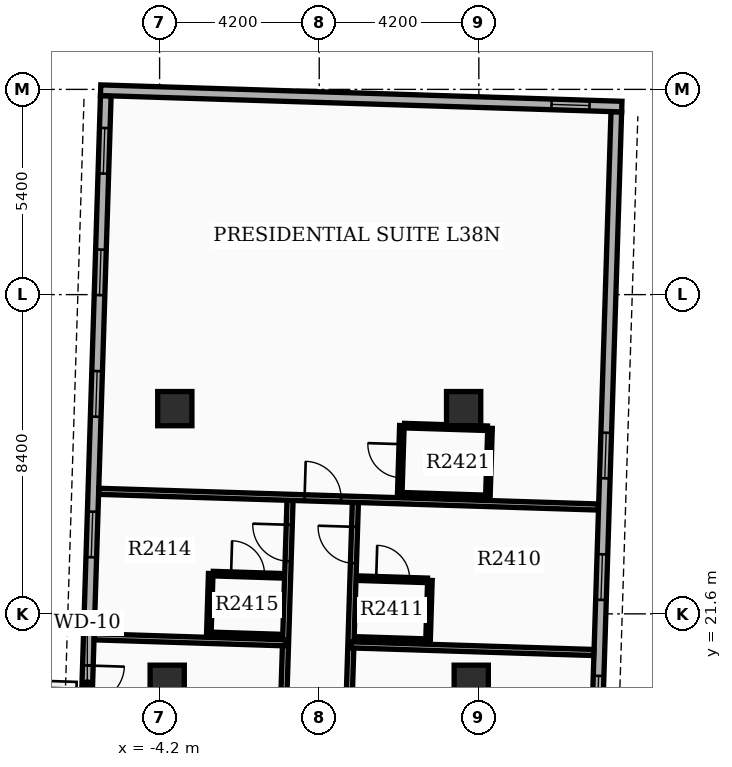
"""IFC4 building model, lengths in metres.
Left out: names, types, materials, properties, quantities, classifications, styles, units other than length and angle.
Written with IfcOpenShell. Run it as: python <this file> out.ifc"""

import sys

from ifc_helpers import new_model, si_unit, direction, frame, frame_2d, origin, origin_2d, place, context, subcontext, project, spatial, rectangle, extrude, element, fill, save


model = new_model("IFC4")
c1 = context("Model", 3, precision=1e-05, world=origin(), true_north=direction((0.0, 1.0)))
c2 = subcontext(c1, "Body", "Model", "MODEL_VIEW")
j1 = project(units=[si_unit("LENGTHUNIT", "METRE"), si_unit("PLANEANGLEUNIT", "RADIAN")], contexts=[c1])
p1 = place(None, origin())
s1 = spatial("IfcSite", under=j1, at=p1, CompositionType="ELEMENT")
p2 = place(p1, origin())
s2 = spatial("IfcBuilding", under=s1, at=p2, CompositionType="ELEMENT")
p3 = place(p2, frame((0.0, 0.0, 152.7)))
s3 = spatial("IfcBuildingStorey", under=s2, at=p3, CompositionType="ELEMENT", Elevation=152.7)
for number, where, z_axis, x_axis in (
    (1, (-4.0, 19.8, 0.0), (0.0, 0.0, 1.0), (1.0, 0.0, 0.0)),
    (2, (4.0, 19.8, 0.0), (0.0, 0.0, 1.0), (1.0, 0.0, 0.0)),
    (3, (-3.8, 27.0, 0.0), (0.0, 0.0, 1.0), (1.0, 0.0, 0.0)),
    (4, (3.8, 27.0, 0.0), (0.0, 0.0, 1.0), (1.0, 0.0, 0.0)),
):
    element("IfcColumn", number, at=place(p3, frame(where, z_axis=z_axis, x_axis=x_axis)), inside=s3, PredefinedType="COLUMN", context=c2, shape_type="SweptSolid", body=[
        extrude(rectangle(XDim=0.9, YDim=0.9, at=origin_2d()), origin(), (0.0, 0.0, 1.0), 3.9),
    ])
p4 = place(p3, frame((7.186, 14.721, 0.0), z_axis=(0.0, 0.0, 1.0), x_axis=(0.031410322165, 0.999506574096, 0.0)))
e5 = element("IfcWall", 5, at=p4, inside=s3, PredefinedType="STANDARD", context=c2, shape_type="SweptSolid", body=[
    extrude(rectangle(XDim=20.1, YDim=0.28, at=frame_2d((10.05, 0.0))), origin(), (0.0, 0.0, 1.0), 2.97),
])
p5 = place(p4, frame((0.85, 0.0, 0.8)))
e6 = element("IfcOpeningElement", 6, at=p5, cuts=e5, PredefinedType="OPENING", context=c2, shape_type="SweptSolid", body=[
    extrude(rectangle(XDim=1.2, YDim=1.6, at=frame_2d((0.6, 0.8))), frame((0.0, 0.15, 0.0), z_axis=(0.0, -1.0, 0.0), x_axis=(1.0, 0.0, 0.0)), (0.0, 0.0, 1.0), 0.3),
])
p6 = place(p4, frame((4.05, 0.0, 0.8)))
e7 = element("IfcOpeningElement", 7, at=p6, cuts=e5, PredefinedType="OPENING", context=c2, shape_type="SweptSolid", body=[
    extrude(rectangle(XDim=1.2, YDim=1.6, at=frame_2d((0.6, 0.8))), frame((0.0, 0.15, 0.0), z_axis=(0.0, -1.0, 0.0), x_axis=(1.0, 0.0, 0.0)), (0.0, 0.0, 1.0), 0.3),
])
p7 = place(p4, frame((7.25, 0.0, 0.8)))
e8 = element("IfcOpeningElement", 8, at=p7, cuts=e5, PredefinedType="OPENING", context=c2, shape_type="SweptSolid", body=[
    extrude(rectangle(XDim=1.2, YDim=1.6, at=frame_2d((0.6, 0.8))), frame((0.0, 0.15, 0.0), z_axis=(0.0, -1.0, 0.0), x_axis=(1.0, 0.0, 0.0)), (0.0, 0.0, 1.0), 0.3),
])
p8 = place(p4, frame((10.45, 0.0, 0.8)))
e9 = element("IfcOpeningElement", 9, at=p8, cuts=e5, PredefinedType="OPENING", context=c2, shape_type="SweptSolid", body=[
    extrude(rectangle(XDim=1.2, YDim=1.6, at=frame_2d((0.6, 0.8))), frame((0.0, 0.15, 0.0), z_axis=(0.0, -1.0, 0.0), x_axis=(1.0, 0.0, 0.0)), (0.0, 0.0, 1.0), 0.3),
])
p9 = place(p3, frame((-5.616, 35.234, 0.0), z_axis=(0.0, 0.0, 1.0), x_axis=(-0.031398187845, -0.999506955354, 0.0)))
e10 = element("IfcWall", 10, at=p9, inside=s3, PredefinedType="STANDARD", context=c2, shape_type="SweptSolid", body=[
    extrude(rectangle(XDim=20.1, YDim=0.28, at=frame_2d((10.05, 0.0))), origin(), (0.0, 0.0, 1.0), 2.97),
])
p10 = place(p9, frame((0.85, 0.0, 0.8)))
e11 = element("IfcOpeningElement", 11, at=p10, cuts=e10, PredefinedType="OPENING", context=c2, shape_type="SweptSolid", body=[
    extrude(rectangle(XDim=1.2, YDim=1.6, at=frame_2d((0.6, 0.8))), frame((0.0, 0.15, 0.0), z_axis=(0.0, -1.0, 0.0), x_axis=(1.0, 0.0, 0.0)), (0.0, 0.0, 1.0), 0.3),
])
p11 = place(p9, frame((4.05, 0.0, 0.8)))
e12 = element("IfcOpeningElement", 12, at=p11, cuts=e10, PredefinedType="OPENING", context=c2, shape_type="SweptSolid", body=[
    extrude(rectangle(XDim=1.2, YDim=1.6, at=frame_2d((0.6, 0.8))), frame((0.0, 0.15, 0.0), z_axis=(0.0, -1.0, 0.0), x_axis=(1.0, 0.0, 0.0)), (0.0, 0.0, 1.0), 0.3),
])
p12 = place(p9, frame((7.25, 0.0, 0.8)))
e13 = element("IfcOpeningElement", 13, at=p12, cuts=e10, PredefinedType="OPENING", context=c2, shape_type="SweptSolid", body=[
    extrude(rectangle(XDim=1.2, YDim=1.6, at=frame_2d((0.6, 0.8))), frame((0.0, 0.15, 0.0), z_axis=(0.0, -1.0, 0.0), x_axis=(1.0, 0.0, 0.0)), (0.0, 0.0, 1.0), 0.3),
])
p13 = place(p9, frame((10.95, 0.0, 0.8)))
e14 = element("IfcOpeningElement", 14, at=p13, cuts=e10, PredefinedType="OPENING", context=c2, shape_type="SweptSolid", body=[
    extrude(rectangle(XDim=1.2, YDim=1.6, at=frame_2d((0.6, 0.8))), frame((0.0, 0.15, 0.0), z_axis=(0.0, -1.0, 0.0), x_axis=(1.0, 0.0, 0.0)), (0.0, 0.0, 1.0), 0.3),
])
p14 = place(p9, frame((15.0, 0.0, 0.0)))
e15 = element("IfcOpeningElement", 15, at=p14, cuts=e10, PredefinedType="OPENING", context=c2, shape_type="SweptSolid", body=[
    extrude(rectangle(XDim=0.96, YDim=2.1, at=frame_2d((0.48, 1.05))), frame((0.0, 0.15, 0.0), z_axis=(0.0, -1.0, 0.0), x_axis=(1.0, 0.0, 0.0)), (0.0, 0.0, 1.0), 0.3),
])
p15 = place(p3, frame((7.962, 34.947, 0.0), z_axis=(0.0, 0.0, 1.0), x_axis=(-0.999506679556, 0.031406966164, 0.0)))
e16 = element("IfcWall", 16, at=p15, inside=s3, PredefinedType="STANDARD", context=c2, shape_type="SweptSolid", body=[
    extrude(rectangle(XDim=13.72, YDim=0.28, at=frame_2d((6.86, 0.0))), origin(), (0.0, 0.0, 1.0), 2.97),
])
p16 = place(p15, frame((0.85, 0.0, 0.85)))
e17 = element("IfcOpeningElement", 17, at=p16, cuts=e16, PredefinedType="OPENING", context=c2, shape_type="SweptSolid", body=[
    extrude(rectangle(XDim=1.0, YDim=1.5, at=frame_2d((0.5, 0.75))), frame((0.0, 0.15, 0.0), z_axis=(0.0, -1.0, 0.0), x_axis=(1.0, 0.0, 0.0)), (0.0, 0.0, 1.0), 0.3),
])
p17 = place(p3, frame((0.646, 14.837, 0.0), z_axis=(0.0, 0.0, 1.0), x_axis=(0.031385618091, 0.999507350137, 0.0)))
e18 = element("IfcWall", 18, at=p17, inside=s3, PredefinedType="PARTITIONING", context=c2, shape_type="SweptSolid", body=[
    extrude(rectangle(XDim=9.7, YDim=0.16, at=frame_2d((4.85, 0.0))), origin(), (0.0, 0.0, 1.0), 2.96),
])
p18 = place(p17, frame((2.575, 0.0, 0.0)))
e19 = element("IfcOpeningElement", 19, at=p18, cuts=e18, PredefinedType="OPENING", context=c2, shape_type="SweptSolid", body=[
    extrude(rectangle(XDim=0.96, YDim=2.15, at=frame_2d((0.48, 1.075))), frame((0.0, 0.09, 0.0), z_axis=(0.0, -1.0, 0.0), x_axis=(1.0, 0.0, 0.0)), (0.0, 0.0, 1.0), 0.18),
])
p19 = place(p17, frame((8.097, 0.0, 0.0)))
e20 = element("IfcOpeningElement", 20, at=p19, cuts=e18, PredefinedType="OPENING", context=c2, shape_type="SweptSolid", body=[
    extrude(rectangle(XDim=0.96, YDim=2.15, at=frame_2d((0.48, 1.075))), frame((0.0, 0.09, 0.0), z_axis=(0.0, -1.0, 0.0), x_axis=(1.0, 0.0, 0.0)), (0.0, 0.0, 1.0), 0.18),
])
p20 = place(p3, frame((0.833, 20.784, 0.0), z_axis=(0.0, 0.0, 1.0), x_axis=(0.999505833379, -0.031433883636, 0.0)))
e21 = element("IfcWall", 21, at=p20, inside=s3, PredefinedType="PARTITIONING", context=c2, shape_type="SweptSolid", body=[
    extrude(rectangle(XDim=6.392, YDim=0.16, at=frame_2d((3.196, 0.0))), origin(), (0.0, 0.0, 1.0), 2.96),
])
p21 = place(p3, frame((1.029, 22.539, 0.0), z_axis=(0.0, 0.0, 1.0), x_axis=(0.999507221803, -0.031389704724, 0.0)))
e22 = element("IfcWall", 22, at=p21, inside=s3, PredefinedType="PARTITIONING", context=c2, shape_type="SweptSolid", body=[
    extrude(rectangle(XDim=1.82, YDim=0.12, at=frame_2d((0.91, 0.0))), origin(), (0.0, 0.0, 1.0), 2.96),
])
p22 = place(p21, frame((0.47, 0.0, 0.0)))
e23 = element("IfcOpeningElement", 23, at=p22, cuts=e22, PredefinedType="OPENING", context=c2, shape_type="SweptSolid", body=[
    extrude(rectangle(XDim=0.88, YDim=2.1, at=frame_2d((0.44, 1.05))), frame((0.0, 0.07, 0.0), z_axis=(0.0, -1.0, 0.0), x_axis=(1.0, 0.0, 0.0)), (0.0, 0.0, 1.0), 0.14),
])
p23 = place(p3, frame((0.978, 20.94, 0.0), z_axis=(0.0, 0.0, 1.0), x_axis=(0.999503004171, -0.03152371574, 0.0)))
e24 = element("IfcWall", 24, at=p23, inside=s3, PredefinedType="PARTITIONING", context=c2, shape_type="SweptSolid", body=[
    extrude(rectangle(XDim=1.82, YDim=0.12, at=frame_2d((0.91, 0.0))), origin(), (0.0, 0.0, 1.0), 2.96),
])
p24 = place(p3, frame((2.862, 20.88, 0.0), z_axis=(0.0, 0.0, 1.0), x_axis=(0.031434839006, 0.999505803333, 0.0)))
e25 = element("IfcWall", 25, at=p24, inside=s3, PredefinedType="PARTITIONING", context=c2, shape_type="SweptSolid", body=[
    extrude(rectangle(XDim=1.6, YDim=0.12, at=frame_2d((0.8, 0.0))), origin(), (0.0, 0.0, 1.0), 2.96),
])
p25 = place(p3, frame((-1.073, 14.891, 0.0), z_axis=(0.0, 0.0, 1.0), x_axis=(0.031411552371, 0.999506535435, 0.0)))
e26 = element("IfcWall", 26, at=p25, inside=s3, PredefinedType="PARTITIONING", context=c2, shape_type="SweptSolid", body=[
    extrude(rectangle(XDim=9.7, YDim=0.16, at=frame_2d((4.85, 0.0))), origin(), (0.0, 0.0, 1.0), 2.96),
])
p26 = place(p25, frame((2.575, 0.0, 0.0)))
e27 = element("IfcOpeningElement", 27, at=p26, cuts=e26, PredefinedType="OPENING", context=c2, shape_type="SweptSolid", body=[
    extrude(rectangle(XDim=0.96, YDim=2.15, at=frame_2d((0.48, 1.075))), frame((0.0, 0.09, 0.0), z_axis=(0.0, -1.0, 0.0), x_axis=(1.0, 0.0, 0.0)), (0.0, 0.0, 1.0), 0.18),
])
p27 = place(p25, frame((8.097, 0.0, 0.0)))
e28 = element("IfcOpeningElement", 28, at=p27, cuts=e26, PredefinedType="OPENING", context=c2, shape_type="SweptSolid", body=[
    extrude(rectangle(XDim=0.96, YDim=2.15, at=frame_2d((0.48, 1.075))), frame((0.0, 0.09, 0.0), z_axis=(0.0, -1.0, 0.0), x_axis=(1.0, 0.0, 0.0)), (0.0, 0.0, 1.0), 0.18),
])
p28 = place(p3, frame((-0.886, 20.838, 0.0), z_axis=(0.0, 0.0, 1.0), x_axis=(-0.999507140691, 0.03139228738, 0.0)))
e29 = element("IfcWall", 29, at=p28, inside=s3, PredefinedType="PARTITIONING", context=c2, shape_type="SweptSolid", body=[
    extrude(rectangle(XDim=5.032, YDim=0.16, at=frame_2d((2.516, 0.0))), origin(), (0.0, 0.0, 1.0), 2.96),
])
p29 = place(p3, frame((-2.79, 22.659, 0.0), z_axis=(0.0, 0.0, 1.0), x_axis=(0.999507221803, -0.031389704724, 0.0)))
e30 = element("IfcWall", 30, at=p29, inside=s3, PredefinedType="PARTITIONING", context=c2, shape_type="SweptSolid", body=[
    extrude(rectangle(XDim=1.82, YDim=0.12, at=frame_2d((0.91, 0.0))), origin(), (0.0, 0.0, 1.0), 2.96),
])
p30 = place(p29, frame((0.47, 0.0, 0.0)))
e31 = element("IfcOpeningElement", 31, at=p30, cuts=e30, PredefinedType="OPENING", context=c2, shape_type="SweptSolid", body=[
    extrude(rectangle(XDim=0.88, YDim=2.1, at=frame_2d((0.44, 1.05))), frame((0.0, 0.07, 0.0), z_axis=(0.0, -1.0, 0.0), x_axis=(1.0, 0.0, 0.0)), (0.0, 0.0, 1.0), 0.14),
])
p31 = place(p3, frame((-2.84, 21.06, 0.0), z_axis=(0.0, 0.0, 1.0), x_axis=(0.999507221803, -0.031389704724, 0.0)))
e32 = element("IfcWall", 32, at=p31, inside=s3, PredefinedType="PARTITIONING", context=c2, shape_type="SweptSolid", body=[
    extrude(rectangle(XDim=1.82, YDim=0.12, at=frame_2d((0.91, 0.0))), origin(), (0.0, 0.0, 1.0), 2.96),
])
p32 = place(p3, frame((-2.905, 21.062, 0.0), z_axis=(0.0, 0.0, 1.0), x_axis=(0.031430045267, 0.999505954087, 0.0)))
e33 = element("IfcWall", 33, at=p32, inside=s3, PredefinedType="PARTITIONING", context=c2, shape_type="SweptSolid", body=[
    extrude(rectangle(XDim=1.6, YDim=0.12, at=frame_2d((0.8, 0.0))), origin(), (0.0, 0.0, 1.0), 2.96),
])
p33 = place(p3, frame((-5.795, 24.824, 0.0), z_axis=(0.0, 0.0, 1.0), x_axis=(0.999507189267, -0.031390740738, 0.0)))
e34 = element("IfcWall", 34, at=p33, inside=s3, PredefinedType="PARTITIONING", context=c2, shape_type="SweptSolid", body=[
    extrude(rectangle(XDim=13.144, YDim=0.16, at=frame_2d((6.572, 0.0))), origin(), (0.0, 0.0, 1.0), 2.96),
])
p34 = place(p33, frame((5.412, 0.0, 0.0)))
e35 = element("IfcOpeningElement", 35, at=p34, cuts=e34, PredefinedType="OPENING", context=c2, shape_type="SweptSolid", body=[
    extrude(rectangle(XDim=0.96, YDim=2.15, at=frame_2d((0.48, 1.075))), frame((0.0, 0.09, 0.0), z_axis=(0.0, -1.0, 0.0), x_axis=(1.0, 0.0, 0.0)), (0.0, 0.0, 1.0), 0.18),
])
p35 = place(p3, frame((2.118, 24.736, 0.0), z_axis=(0.0, 0.0, 1.0), x_axis=(0.03152371574, 0.999503004171, 0.0)))
e36 = element("IfcWall", 36, at=p35, inside=s3, PredefinedType="PARTITIONING", context=c2, shape_type="SweptSolid", body=[
    extrude(rectangle(XDim=1.82, YDim=0.12, at=frame_2d((0.91, 0.0))), origin(), (0.0, 0.0, 1.0), 2.96),
])
p36 = place(p35, frame((0.45, 0.0, 0.0)))
e37 = element("IfcOpeningElement", 37, at=p36, cuts=e36, PredefinedType="OPENING", context=c2, shape_type="SweptSolid", body=[
    extrude(rectangle(XDim=0.88, YDim=2.1, at=frame_2d((0.44, 1.05))), frame((0.0, 0.07, 0.0), z_axis=(0.0, -1.0, 0.0), x_axis=(1.0, 0.0, 0.0)), (0.0, 0.0, 1.0), 0.14),
])
p37 = place(p3, frame((4.437, 24.663, 0.0), z_axis=(0.0, 0.0, 1.0), x_axis=(0.031255692016, 0.999511421504, 0.0)))
e38 = element("IfcWall", 38, at=p37, inside=s3, PredefinedType="PARTITIONING", context=c2, shape_type="SweptSolid", body=[
    extrude(rectangle(XDim=1.82, YDim=0.12, at=frame_2d((0.91, 0.0))), origin(), (0.0, 0.0, 1.0), 2.96),
])
for number, where, z_axis, x_axis in (
    (39, (2.188, 24.733, 0.0), (0.0, 0.0, 1.0), (1.0, -0.031, 0.0)),
    (40, (2.245, 26.552, 0.0), (0.0, 0.0, 1.0), (1.0, -0.031, 0.0)),
):
    element("IfcWall", number, at=place(p3, frame(where, z_axis=z_axis, x_axis=x_axis)), inside=s3, PredefinedType="PARTITIONING", context=c2, shape_type="SweptSolid", body=[
        extrude(rectangle(XDim=2.18, YDim=0.12, at=frame_2d((1.09, 0.0))), origin(), (0.0, 0.0, 1.0), 2.96),
    ])
p38 = place(p6, origin())
e41 = element("IfcWindow", 41, at=p38, inside=s3, PartitioningType="SINGLE_PANEL", PredefinedType="WINDOW", context=c2, shape_type="SweptSolid", body=[
    extrude(rectangle(XDim=1.2, YDim=1.6, at=frame_2d((0.6, 0.8))), frame((0.0, 0.03, 0.0), z_axis=(0.0, -1.0, 0.0), x_axis=(1.0, 0.0, 0.0)), (0.0, 0.0, 1.0), 0.06),
])
fill(e7, e41)
p39 = place(p7, origin())
e42 = element("IfcWindow", 42, at=p39, inside=s3, PartitioningType="SINGLE_PANEL", PredefinedType="WINDOW", context=c2, shape_type="SweptSolid", body=[
    extrude(rectangle(XDim=1.2, YDim=1.6, at=frame_2d((0.6, 0.8))), frame((0.0, 0.03, 0.0), z_axis=(0.0, -1.0, 0.0), x_axis=(1.0, 0.0, 0.0)), (0.0, 0.0, 1.0), 0.06),
])
fill(e8, e42)
p40 = place(p8, origin())
e43 = element("IfcWindow", 43, at=p40, inside=s3, PartitioningType="SINGLE_PANEL", PredefinedType="WINDOW", context=c2, shape_type="SweptSolid", body=[
    extrude(rectangle(XDim=1.2, YDim=1.6, at=frame_2d((0.6, 0.8))), frame((0.0, 0.03, 0.0), z_axis=(0.0, -1.0, 0.0), x_axis=(1.0, 0.0, 0.0)), (0.0, 0.0, 1.0), 0.06),
])
fill(e9, e43)
p41 = place(p10, origin())
e44 = element("IfcWindow", 44, at=p41, inside=s3, PartitioningType="SINGLE_PANEL", PredefinedType="WINDOW", context=c2, shape_type="SweptSolid", body=[
    extrude(rectangle(XDim=1.2, YDim=1.6, at=frame_2d((0.6, 0.8))), frame((0.0, 0.03, 0.0), z_axis=(0.0, -1.0, 0.0), x_axis=(1.0, 0.0, 0.0)), (0.0, 0.0, 1.0), 0.06),
])
fill(e11, e44)
p42 = place(p11, origin())
e45 = element("IfcWindow", 45, at=p42, inside=s3, PartitioningType="SINGLE_PANEL", PredefinedType="WINDOW", context=c2, shape_type="SweptSolid", body=[
    extrude(rectangle(XDim=1.2, YDim=1.6, at=frame_2d((0.6, 0.8))), frame((0.0, 0.03, 0.0), z_axis=(0.0, -1.0, 0.0), x_axis=(1.0, 0.0, 0.0)), (0.0, 0.0, 1.0), 0.06),
])
fill(e12, e45)
p43 = place(p12, origin())
e46 = element("IfcWindow", 46, at=p43, inside=s3, PartitioningType="SINGLE_PANEL", PredefinedType="WINDOW", context=c2, shape_type="SweptSolid", body=[
    extrude(rectangle(XDim=1.2, YDim=1.6, at=frame_2d((0.6, 0.8))), frame((0.0, 0.03, 0.0), z_axis=(0.0, -1.0, 0.0), x_axis=(1.0, 0.0, 0.0)), (0.0, 0.0, 1.0), 0.06),
])
fill(e13, e46)
p44 = place(p13, origin())
e47 = element("IfcWindow", 47, at=p44, inside=s3, PartitioningType="SINGLE_PANEL", PredefinedType="WINDOW", context=c2, shape_type="SweptSolid", body=[
    extrude(rectangle(XDim=1.2, YDim=1.6, at=frame_2d((0.6, 0.8))), frame((0.0, 0.03, 0.0), z_axis=(0.0, -1.0, 0.0), x_axis=(1.0, 0.0, 0.0)), (0.0, 0.0, 1.0), 0.06),
])
fill(e14, e47)
p45 = place(p16, origin())
e48 = element("IfcWindow", 48, at=p45, inside=s3, PartitioningType="SINGLE_PANEL", PredefinedType="WINDOW", context=c2, shape_type="SweptSolid", body=[
    extrude(rectangle(XDim=1.0, YDim=1.5, at=frame_2d((0.5, 0.75))), frame((0.0, 0.03, 0.0), z_axis=(0.0, -1.0, 0.0), x_axis=(1.0, 0.0, 0.0)), (0.0, 0.0, 1.0), 0.06),
])
fill(e17, e48)
p46 = place(p14, origin())
e49 = element("IfcDoor", 49, at=p46, inside=s3, OperationType="SINGLE_SWING_LEFT", PredefinedType="DOOR", context=c2, shape_type="SweptSolid", body=[
    extrude(rectangle(XDim=0.96, YDim=2.1, at=frame_2d((0.48, 1.05))), frame((0.0, 0.025, 0.0), z_axis=(0.0, -1.0, 0.0), x_axis=(1.0, 0.0, 0.0)), (0.0, 0.0, 1.0), 0.05),
])
fill(e15, e49)
p47 = place(p19, origin())
e50 = element("IfcDoor", 50, at=p47, inside=s3, OperationType="SINGLE_SWING_RIGHT", PredefinedType="DOOR", context=c2, shape_type="SweptSolid", body=[
    extrude(rectangle(XDim=0.96, YDim=2.15, at=frame_2d((0.48, 1.075))), frame((0.0, 0.025, 0.0), z_axis=(0.0, -1.0, 0.0), x_axis=(1.0, 0.0, 0.0)), (0.0, 0.0, 1.0), 0.05),
])
fill(e20, e50)
p48 = place(p22, origin())
e51 = element("IfcDoor", 51, at=p48, inside=s3, OperationType="SINGLE_SWING_LEFT", PredefinedType="DOOR", context=c2, shape_type="SweptSolid", body=[
    extrude(rectangle(XDim=0.88, YDim=2.1, at=frame_2d((0.44, 1.05))), frame((0.0, 0.025, 0.0), z_axis=(0.0, -1.0, 0.0), x_axis=(1.0, 0.0, 0.0)), (0.0, 0.0, 1.0), 0.05),
])
fill(e23, e51)
p49 = place(p27, origin())
e52 = element("IfcDoor", 52, at=p49, inside=s3, OperationType="SINGLE_SWING_RIGHT", PredefinedType="DOOR", context=c2, shape_type="SweptSolid", body=[
    extrude(rectangle(XDim=0.96, YDim=2.15, at=frame_2d((0.48, 1.075))), frame((0.0, 0.025, 0.0), z_axis=(0.0, -1.0, 0.0), x_axis=(1.0, 0.0, 0.0)), (0.0, 0.0, 1.0), 0.05),
])
fill(e28, e52)
p50 = place(p30, origin())
e53 = element("IfcDoor", 53, at=p50, inside=s3, OperationType="SINGLE_SWING_LEFT", PredefinedType="DOOR", context=c2, shape_type="SweptSolid", body=[
    extrude(rectangle(XDim=0.88, YDim=2.1, at=frame_2d((0.44, 1.05))), frame((0.0, 0.025, 0.0), z_axis=(0.0, -1.0, 0.0), x_axis=(1.0, 0.0, 0.0)), (0.0, 0.0, 1.0), 0.05),
])
fill(e31, e53)
p51 = place(p34, origin())
e54 = element("IfcDoor", 54, at=p51, inside=s3, OperationType="SINGLE_SWING_LEFT", PredefinedType="DOOR", context=c2, shape_type="SweptSolid", body=[
    extrude(rectangle(XDim=0.96, YDim=2.15, at=frame_2d((0.48, 1.075))), frame((0.0, 0.025, 0.0), z_axis=(0.0, -1.0, 0.0), x_axis=(1.0, 0.0, 0.0)), (0.0, 0.0, 1.0), 0.05),
])
fill(e35, e54)
p52 = place(p36, origin())
e55 = element("IfcDoor", 55, at=p52, inside=s3, OperationType="SINGLE_SWING_RIGHT", PredefinedType="DOOR", context=c2, shape_type="SweptSolid", body=[
    extrude(rectangle(XDim=0.88, YDim=2.1, at=frame_2d((0.44, 1.05))), frame((0.0, 0.025, 0.0), z_axis=(0.0, -1.0, 0.0), x_axis=(1.0, 0.0, 0.0)), (0.0, 0.0, 1.0), 0.05),
])
fill(e37, e55)
save(model, sys.argv[1])
